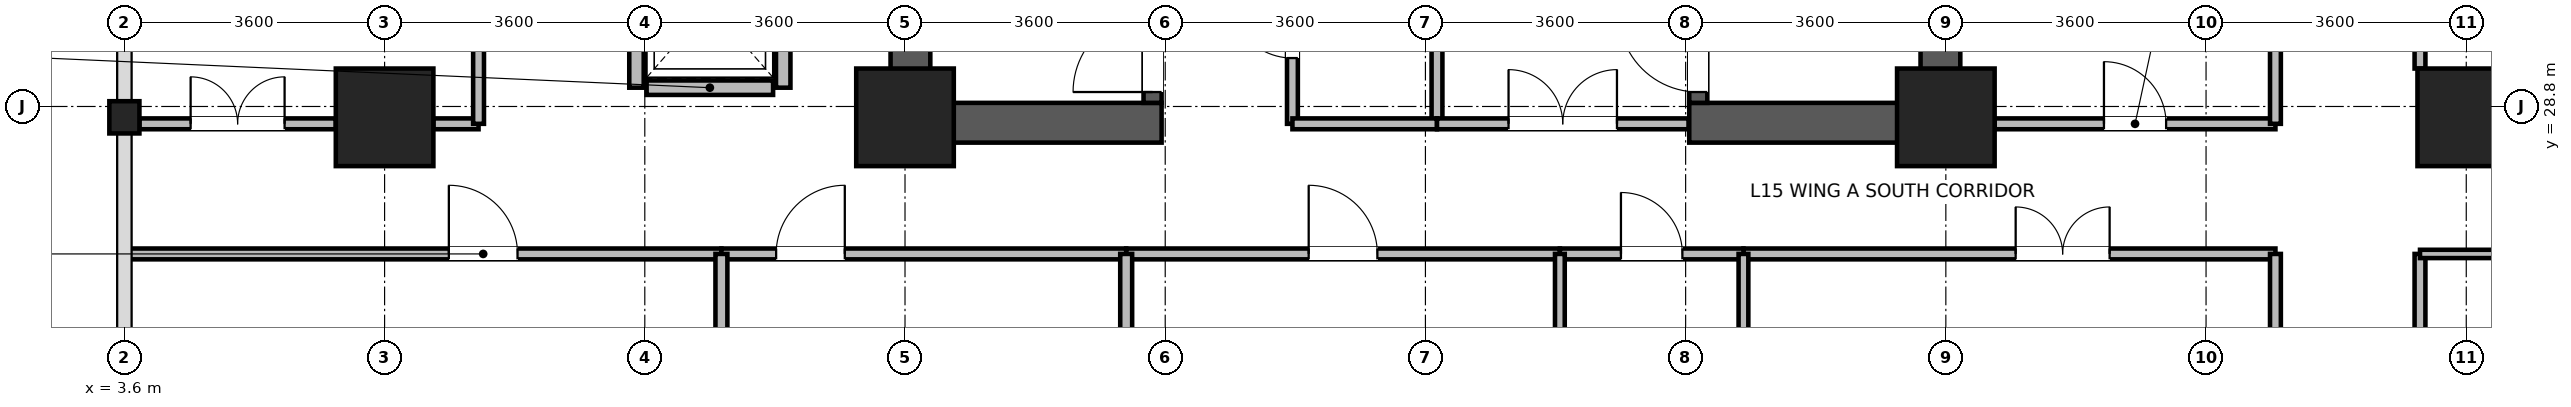
"""IFC4 building model, lengths in metres.
Left out: names, types, materials, properties, quantities, classifications, styles, units other than length and angle.
Written with IfcOpenShell. Run it as: python <this file> out.ifc"""

import sys

from ifc_helpers import new_model, si_unit, direction, frame, frame_2d, origin, origin_2d, place, context, subcontext, project, spatial, rectangle, i_section, extrude, source, transform, mapped, element, fill, save


model = new_model("IFC4")
c1 = context("Model", 3, precision=1e-05, world=origin(), true_north=direction((0.0, 1.0)))
c2 = subcontext(c1, "Body", "Model", "MODEL_VIEW")
j1 = project(units=[si_unit("LENGTHUNIT", "METRE"), si_unit("PLANEANGLEUNIT", "RADIAN")], contexts=[c1])
p1 = place(None, origin())
s1 = spatial("IfcSite", under=j1, at=p1, CompositionType="ELEMENT")
p2 = place(p1, origin())
s2 = spatial("IfcBuilding", under=s1, at=p2, CompositionType="ELEMENT")
p3 = place(p2, frame((0.0, 0.0, 62.3)))
s3 = spatial("IfcBuildingStorey", under=s2, at=p3, CompositionType="ELEMENT", Elevation=62.3)
for number, where, z_axis, x_axis in (
    (1, (14.475, 28.3, 0.0), (0.0, 0.0, 1.0), (0.0, 1.0, 0.0)),
    (2, (28.725, 28.3, 0.0), (0.0, 0.0, 1.0), (0.0, 1.0, 0.0)),
):
    element("IfcWall", number, at=place(p3, frame(where, z_axis=z_axis, x_axis=x_axis)), inside=s3, PredefinedType="SHEAR", context=c2, shape_type="SweptSolid", body=[
        extrude(rectangle(XDim=8.1, YDim=0.55, at=frame_2d((4.05, 0.0))), origin(), (0.0, 0.0, 1.0), 3.45),
    ])
for number, where, z_axis, x_axis in (
    (3, (14.75, 28.575, 0.0), (0.0, 0.0, 1.0), (1.0, 0.0, 0.0)),
    (4, (25.25, 28.575, 0.0), (0.0, 0.0, 1.0), (1.0, 0.0, 0.0)),
):
    element("IfcWall", number, at=place(p3, frame(where, z_axis=z_axis, x_axis=x_axis)), inside=s3, PredefinedType="SHEAR", context=c2, shape_type="SweptSolid", body=[
        extrude(rectangle(XDim=3.2, YDim=0.55, at=frame_2d((1.6, 0.0))), origin(), (0.0, 0.0, 1.0), 3.45),
    ])
p4 = place(p3, frame((17.825, 28.85, 0.0), z_axis=(0.0, 0.0, 1.0), x_axis=(0.0, 1.0, 0.0)))
e5 = element("IfcWall", 5, at=p4, inside=s3, PredefinedType="SHEAR", context=c2, shape_type="SweptSolid", body=[
    extrude(rectangle(XDim=7.0, YDim=0.25, at=frame_2d((3.5, 0.0))), origin(), (0.0, 0.0, 1.0), 3.45),
])
p5 = place(p4, frame((0.15, 0.0, 0.0)))
e6 = element("IfcOpeningElement", 6, at=p5, cuts=e5, PredefinedType="OPENING", context=c2, shape_type="SweptSolid", body=[
    extrude(rectangle(XDim=1.1, YDim=2.08, at=frame_2d((0.55, 1.04))), frame((0.0, 0.135, 0.0), z_axis=(0.0, -1.0, 0.0), x_axis=(1.0, 0.0, 0.0)), (0.0, 0.0, 1.0), 0.27),
])
p6 = place(p3, frame((25.375, 28.85, 0.0), z_axis=(0.0, 0.0, 1.0), x_axis=(0.0, 1.0, 0.0)))
e7 = element("IfcWall", 7, at=p6, inside=s3, PredefinedType="SHEAR", context=c2, shape_type="SweptSolid", body=[
    extrude(rectangle(XDim=7.0, YDim=0.25, at=frame_2d((3.5, 0.0))), origin(), (0.0, 0.0, 1.0), 3.45),
])
p7 = place(p6, frame((0.15, 0.0, 0.0)))
e8 = element("IfcOpeningElement", 8, at=p7, cuts=e7, PredefinedType="OPENING", context=c2, shape_type="SweptSolid", body=[
    extrude(rectangle(XDim=1.1, YDim=2.08, at=frame_2d((0.55, 1.04))), frame((0.0, 0.135, 0.0), z_axis=(0.0, -1.0, 0.0), x_axis=(1.0, 0.0, 0.0)), (0.0, 0.0, 1.0), 0.27),
])
m1 = source(origin(), c2, "Body", "SweptSolid", [
    extrude(rectangle(XDim=1.35, YDim=1.35, at=origin_2d()), origin(), (0.0, 0.0, 1.0), 3.7),
])
for number, where, z_axis, x_axis in (
    (9, (7.2, 28.65, 0.0), (0.0, 0.0, 1.0), (1.0, 0.0, 0.0)),
    (10, (14.4, 28.65, 0.0), (0.0, 0.0, 1.0), (1.0, 0.0, 0.0)),
    (11, (28.8, 28.65, 0.0), (0.0, 0.0, 1.0), (1.0, 0.0, 0.0)),
    (12, (36.0, 28.65, 0.0), (0.0, 0.0, 1.0), (1.0, 0.0, 0.0)),
):
    element("IfcColumn", number, at=place(p3, frame(where, z_axis=z_axis, x_axis=x_axis)), inside=s3, PredefinedType="COLUMN", context=c2, shape_type="MappedRepresentation", body=[
        mapped(m1, transform((0.0, 0.0, 0.0), x_axis=(1.0, 0.0, 0.0), y_axis=(0.0, 1.0, 0.0), z_axis=(0.0, 0.0, 1.0), scale=1.0)),
    ])
m2 = source(origin(), c2, "Body", "SweptSolid", [
    extrude(i_section(OverallWidth=0.416, OverallDepth=0.446, WebThickness=0.029, FlangeThickness=0.04, FilletRadius=0.015, at=origin_2d()), origin(), (0.0, 0.0, 1.0), 3.7),
])
p8 = place(p3, frame((3.6, 28.65, 0.0), z_axis=(0.0, 0.0, 1.0), x_axis=(1.0, 0.0, 0.0)))
e13 = element("IfcColumn", 13, at=p8, inside=s3, PredefinedType="COLUMN", context=c2, shape_type="MappedRepresentation", body=[
    mapped(m2, transform((0.0, 0.0, 0.0), x_axis=(1.0, 0.0, 0.0), y_axis=(0.0, 1.0, 0.0), z_axis=(0.0, 0.0, 1.0), scale=1.0)),
])
p9 = place(p3, frame((10.825, 29.06, 0.0), z_axis=(0.0, 0.0, 1.0), x_axis=(1.0, 0.0, 0.0)))
e14 = element("IfcWall", 14, at=p9, inside=s3, PredefinedType="PARTITIONING", context=c2, shape_type="SweptSolid", body=[
    extrude(rectangle(XDim=1.75, YDim=0.2, at=frame_2d((0.875, 0.0))), origin(), (0.0, 0.0, 1.0), 3.43),
])
for number, where, z_axis, x_axis in (
    (15, (10.685, 29.06, 0.0), (0.0, 0.0, 1.0), (0.0, 1.0, 0.0)),
    (16, (12.715, 29.06, 0.0), (0.0, 0.0, 1.0), (0.0, 1.0, 0.0)),
):
    element("IfcWall", number, at=place(p3, frame(where, z_axis=z_axis, x_axis=x_axis)), inside=s3, PredefinedType="PARTITIONING", context=c2, shape_type="SweptSolid", body=[
        extrude(rectangle(XDim=2.28, YDim=0.2, at=frame_2d((1.14, 0.0))), origin(), (0.0, 0.0, 1.0), 3.43),
    ])
p10 = place(p3, frame((35.36, 22.275, 0.0), z_axis=(0.0, 0.0, 1.0), x_axis=(0.0, 1.0, 0.0)))
e17 = element("IfcWall", 17, at=p10, inside=s3, PredefinedType="PARTITIONING", context=c2, shape_type="SweptSolid", body=[
    extrude(rectangle(XDim=4.485, YDim=0.15, at=frame_2d((2.243, 0.0))), origin(), (0.0, 0.0, 1.0), 3.43),
])
p11 = place(p3, frame((3.62, 26.76, 0.0), z_axis=(0.0, 0.0, 1.0), x_axis=(1.0, 0.0, 0.0)))
e18 = element("IfcWall", 18, at=p11, inside=s3, PredefinedType="PARTITIONING", context=c2, shape_type="SweptSolid", body=[
    extrude(rectangle(XDim=8.24, YDim=0.15, at=frame_2d((4.12, 0.0))), origin(), (0.0, 0.0, 1.0), 3.43),
])
p12 = place(p11, frame((4.469, 0.0, 0.0)))
e19 = element("IfcOpeningElement", 19, at=p12, cuts=e18, PredefinedType="OPENING", context=c2, shape_type="SweptSolid", body=[
    extrude(rectangle(XDim=0.95, YDim=2.1, at=frame_2d((0.475, 1.05))), frame((0.0, 0.085, 0.0), z_axis=(0.0, -1.0, 0.0), x_axis=(1.0, 0.0, 0.0)), (0.0, 0.0, 1.0), 0.17),
])
p13 = place(p3, frame((35.36, 29.325, 0.0), z_axis=(0.0, 0.0, 1.0), x_axis=(0.0, 1.0, 0.0)))
e20 = element("IfcWall", 20, at=p13, inside=s3, PredefinedType="PARTITIONING", context=c2, shape_type="SweptSolid", body=[
    extrude(rectangle(XDim=6.15, YDim=0.15, at=frame_2d((3.075, 0.0))), origin(), (0.0, 0.0, 1.0), 3.43),
])
p14 = place(p13, frame((2.425, 0.0, 0.0)))
e21 = element("IfcOpeningElement", 21, at=p14, cuts=e20, PredefinedType="OPENING", context=c2, shape_type="SweptSolid", body=[
    extrude(rectangle(XDim=1.3, YDim=2.12, at=frame_2d((0.65, 1.06))), frame((0.0, 0.085, 0.0), z_axis=(0.0, -1.0, 0.0), x_axis=(1.0, 0.0, 0.0)), (0.0, 0.0, 1.0), 0.17),
])
p15 = place(p3, frame((26.0, 26.76, 0.0), z_axis=(0.0, 0.0, 1.0), x_axis=(1.0, 0.0, 0.0)))
e22 = element("IfcWall", 22, at=p15, inside=s3, PredefinedType="PARTITIONING", context=c2, shape_type="SweptSolid", body=[
    extrude(rectangle(XDim=7.36, YDim=0.15, at=frame_2d((3.68, 0.0))), origin(), (0.0, 0.0, 1.0), 3.43),
])
p16 = place(p15, frame((3.766, 0.0, 0.0)))
e23 = element("IfcOpeningElement", 23, at=p16, cuts=e22, PredefinedType="OPENING", context=c2, shape_type="SweptSolid", body=[
    extrude(rectangle(XDim=1.3, YDim=2.12, at=frame_2d((0.65, 1.06))), frame((0.0, 0.085, 0.0), z_axis=(0.0, -1.0, 0.0), x_axis=(1.0, 0.0, 0.0)), (0.0, 0.0, 1.0), 0.17),
])
p17 = place(p3, frame((17.46, 26.76, 0.0), z_axis=(0.0, 0.0, 1.0), x_axis=(1.0, 0.0, 0.0)))
e24 = element("IfcWall", 24, at=p17, inside=s3, PredefinedType="PARTITIONING", context=c2, shape_type="SweptSolid", body=[
    extrude(rectangle(XDim=6.0, YDim=0.15, at=frame_2d((3.0, 0.0))), origin(), (0.0, 0.0, 1.0), 3.43),
])
p18 = place(p17, frame((2.525, 0.0, 0.0)))
e25 = element("IfcOpeningElement", 25, at=p18, cuts=e24, PredefinedType="OPENING", context=c2, shape_type="SweptSolid", body=[
    extrude(rectangle(XDim=0.95, YDim=2.1, at=frame_2d((0.475, 1.05))), frame((0.0, 0.085, 0.0), z_axis=(0.0, -1.0, 0.0), x_axis=(1.0, 0.0, 0.0)), (0.0, 0.0, 1.0), 0.17),
])
p19 = place(p3, frame((11.86, 26.76, 0.0), z_axis=(0.0, 0.0, 1.0), x_axis=(1.0, 0.0, 0.0)))
e26 = element("IfcWall", 26, at=p19, inside=s3, PredefinedType="PARTITIONING", context=c2, shape_type="SweptSolid", body=[
    extrude(rectangle(XDim=5.6, YDim=0.15, at=frame_2d((2.8, 0.0))), origin(), (0.0, 0.0, 1.0), 3.43),
])
p20 = place(p19, frame((0.757, 0.0, 0.0)))
e27 = element("IfcOpeningElement", 27, at=p20, cuts=e26, PredefinedType="OPENING", context=c2, shape_type="SweptSolid", body=[
    extrude(rectangle(XDim=0.95, YDim=2.1, at=frame_2d((0.475, 1.05))), frame((0.0, 0.085, 0.0), z_axis=(0.0, -1.0, 0.0), x_axis=(1.0, 0.0, 0.0)), (0.0, 0.0, 1.0), 0.17),
])
p21 = place(p3, frame((33.36, 21.6, 0.0), z_axis=(0.0, 0.0, 1.0), x_axis=(0.0, 1.0, 0.0)))
e28 = element("IfcWall", 28, at=p21, inside=s3, PredefinedType="PARTITIONING", context=c2, shape_type="SweptSolid", body=[
    extrude(rectangle(XDim=5.16, YDim=0.15, at=frame_2d((2.58, 0.0))), origin(), (0.0, 0.0, 1.0), 3.43),
])
p22 = place(p3, frame((3.808, 28.56, 0.0), z_axis=(0.0, 0.0, 1.0), x_axis=(1.0, 0.0, 0.0)))
e29 = element("IfcWall", 29, at=p22, inside=s3, PredefinedType="PARTITIONING", context=c2, shape_type="SweptSolid", body=[
    extrude(rectangle(XDim=2.717, YDim=0.15, at=frame_2d((1.358, 0.0))), origin(), (0.0, 0.0, 1.0), 2.78),
])
p23 = place(p22, frame((0.708, 0.0, 0.0)))
e30 = element("IfcOpeningElement", 30, at=p23, cuts=e29, PredefinedType="OPENING", context=c2, shape_type="SweptSolid", body=[
    extrude(rectangle(XDim=1.3, YDim=2.12, at=frame_2d((0.65, 1.06))), frame((0.0, 0.085, 0.0), z_axis=(0.0, -1.0, 0.0), x_axis=(1.0, 0.0, 0.0)), (0.0, 0.0, 1.0), 0.17),
])
p24 = place(p3, frame((7.875, 28.56, 0.0), z_axis=(0.0, 0.0, 1.0), x_axis=(1.0, 0.0, 0.0)))
e31 = element("IfcWall", 31, at=p24, inside=s3, PredefinedType="PARTITIONING", context=c2, shape_type="SweptSolid", body=[
    extrude(rectangle(XDim=0.625, YDim=0.15, at=frame_2d((0.312, 0.0))), origin(), (0.0, 0.0, 1.0), 2.78),
])
p25 = place(p3, frame((29.475, 28.56, 0.0), z_axis=(0.0, 0.0, 1.0), x_axis=(1.0, 0.0, 0.0)))
e32 = element("IfcWall", 32, at=p25, inside=s3, PredefinedType="PARTITIONING", context=c2, shape_type="SweptSolid", body=[
    extrude(rectangle(XDim=3.885, YDim=0.15, at=frame_2d((1.942, 0.0))), origin(), (0.0, 0.0, 1.0), 2.78),
])
p26 = place(p25, frame((1.512, 0.0, 0.0)))
e33 = element("IfcOpeningElement", 33, at=p26, cuts=e32, PredefinedType="OPENING", context=c2, shape_type="SweptSolid", body=[
    extrude(rectangle(XDim=0.86, YDim=2.02, at=frame_2d((0.43, 1.01))), frame((0.0, 0.085, 0.0), z_axis=(0.0, -1.0, 0.0), x_axis=(1.0, 0.0, 0.0)), (0.0, 0.0, 1.0), 0.17),
])
p27 = place(p3, frame((8.5, 28.56, 0.0), z_axis=(0.0, 0.0, 1.0), x_axis=(0.0, 1.0, 0.0)))
e34 = element("IfcWall", 34, at=p27, inside=s3, PredefinedType="PARTITIONING", context=c2, shape_type="SweptSolid", body=[
    extrude(rectangle(XDim=3.84, YDim=0.15, at=frame_2d((1.92, 0.0))), origin(), (0.0, 0.0, 1.0), 3.43),
])
p28 = place(p3, frame((33.36, 28.56, 0.0), z_axis=(0.0, 0.0, 1.0), x_axis=(0.0, 1.0, 0.0)))
e35 = element("IfcWall", 35, at=p28, inside=s3, PredefinedType="PARTITIONING", context=c2, shape_type="SweptSolid", body=[
    extrude(rectangle(XDim=3.08, YDim=0.15, at=frame_2d((1.54, 0.0))), origin(), (0.0, 0.0, 1.0), 3.43),
])
p29 = place(p3, frame((19.76, 28.56, 0.0), z_axis=(0.0, 0.0, 1.0), x_axis=(0.0, 1.0, 0.0)))
e36 = element("IfcWall", 36, at=p29, inside=s3, PredefinedType="PARTITIONING", context=c2, shape_type="SweptSolid", body=[
    extrude(rectangle(XDim=2.68, YDim=0.15, at=frame_2d((1.34, 0.0))), origin(), (0.0, 0.0, 1.0), 3.43),
])
p30 = place(p29, frame((0.91, 0.0, 0.0)))
e37 = element("IfcOpeningElement", 37, at=p30, cuts=e36, PredefinedType="OPENING", context=c2, shape_type="SweptSolid", body=[
    extrude(rectangle(XDim=0.86, YDim=2.02, at=frame_2d((0.43, 1.01))), frame((0.0, 0.085, 0.0), z_axis=(0.0, -1.0, 0.0), x_axis=(1.0, 0.0, 0.0)), (0.0, 0.0, 1.0), 0.17),
])
p31 = place(p3, frame((21.76, 28.56, 0.0), z_axis=(0.0, 0.0, 1.0), x_axis=(0.0, 1.0, 0.0)))
e38 = element("IfcWall", 38, at=p31, inside=s3, PredefinedType="PARTITIONING", context=c2, shape_type="SweptSolid", body=[
    extrude(rectangle(XDim=2.68, YDim=0.15, at=frame_2d((1.34, 0.0))), origin(), (0.0, 0.0, 1.0), 3.43),
])
p32 = place(p3, frame((23.46, 26.76, 0.0), z_axis=(0.0, 0.0, 1.0), x_axis=(1.0, 0.0, 0.0)))
e39 = element("IfcWall", 39, at=p32, inside=s3, PredefinedType="PARTITIONING", context=c2, shape_type="SweptSolid", body=[
    extrude(rectangle(XDim=2.54, YDim=0.15, at=frame_2d((1.27, 0.0))), origin(), (0.0, 0.0, 1.0), 3.43),
])
p33 = place(p32, frame((0.845, 0.0, 0.0)))
e40 = element("IfcOpeningElement", 40, at=p33, cuts=e39, PredefinedType="OPENING", context=c2, shape_type="SweptSolid", body=[
    extrude(rectangle(XDim=0.85, YDim=2.04, at=frame_2d((0.425, 1.02))), frame((0.0, 0.085, 0.0), z_axis=(0.0, -1.0, 0.0), x_axis=(1.0, 0.0, 0.0)), (0.0, 0.0, 1.0), 0.17),
])
p34 = place(p3, frame((19.76, 28.56, 0.0), z_axis=(0.0, 0.0, 1.0), x_axis=(1.0, 0.0, 0.0)))
e41 = element("IfcWall", 41, at=p34, inside=s3, PredefinedType="PARTITIONING", context=c2, shape_type="SweptSolid", body=[
    extrude(rectangle(XDim=2.0, YDim=0.15, at=frame_2d((1.0, 0.0))), origin(), (0.0, 0.0, 1.0), 2.23),
])
p35 = place(p3, frame((35.36, 26.76, 0.0), z_axis=(0.0, 0.0, 1.0), x_axis=(1.0, 0.0, 0.0)))
e42 = element("IfcWall", 42, at=p35, inside=s3, PredefinedType="PARTITIONING", context=c2, shape_type="SweptSolid", body=[
    extrude(rectangle(XDim=6.04, YDim=0.115, at=frame_2d((3.02, 0.0))), origin(), (0.0, 0.0, 1.0), 3.43),
])
p36 = place(p3, frame((17.46, 21.732, 0.0), z_axis=(0.0, 0.0, 1.0), x_axis=(0.0, 1.0, 0.0)))
e43 = element("IfcWall", 43, at=p36, inside=s3, PredefinedType="PARTITIONING", context=c2, shape_type="SweptSolid", body=[
    extrude(rectangle(XDim=5.028, YDim=0.165, at=frame_2d((2.514, 0.0))), origin(), (0.0, 0.0, 1.0), 3.43),
])
for number, where, z_axis, x_axis in (
    (44, (23.46, 21.732, 0.0), (0.0, 0.0, 1.0), (0.0, 1.0, 0.0)),
    (45, (26.0, 21.732, 0.0), (0.0, 0.0, 1.0), (0.0, 1.0, 0.0)),
):
    element("IfcWall", number, at=place(p3, frame(where, z_axis=z_axis, x_axis=x_axis)), inside=s3, PredefinedType="PARTITIONING", context=c2, shape_type="SweptSolid", body=[
        extrude(rectangle(XDim=5.028, YDim=0.135, at=frame_2d((2.514, 0.0))), origin(), (0.0, 0.0, 1.0), 3.43),
    ])
p37 = place(p3, frame((21.76, 28.56, 0.0), z_axis=(0.0, 0.0, 1.0), x_axis=(1.0, 0.0, 0.0)))
e46 = element("IfcWall", 46, at=p37, inside=s3, PredefinedType="PARTITIONING", context=c2, shape_type="SweptSolid", body=[
    extrude(rectangle(XDim=3.48, YDim=0.15, at=frame_2d((1.74, 0.0))), origin(), (0.0, 0.0, 1.0), 2.23),
])
p38 = place(p37, frame((0.99, 0.0, 0.0)))
e47 = element("IfcOpeningElement", 47, at=p38, cuts=e46, PredefinedType="OPENING", context=c2, shape_type="SweptSolid", body=[
    extrude(rectangle(XDim=1.5, YDim=2.1, at=frame_2d((0.75, 1.05))), frame((0.0, 0.085, 0.0), z_axis=(0.0, -1.0, 0.0), x_axis=(1.0, 0.0, 0.0)), (0.0, 0.0, 1.0), 0.17),
])
p39 = place(p3, frame((11.86, 23.5, 0.0), z_axis=(0.0, 0.0, 1.0), x_axis=(0.0, 1.0, 0.0)))
e48 = element("IfcWall", 48, at=p39, inside=s3, PredefinedType="PARTITIONING", context=c2, shape_type="SweptSolid", body=[
    extrude(rectangle(XDim=3.26, YDim=0.165, at=frame_2d((1.63, 0.0))), origin(), (0.0, 0.0, 1.0), 3.43),
])
p40 = place(p5, origin())
e49 = element("IfcDoor", 49, at=p40, inside=s3, OperationType="SINGLE_SWING_LEFT", PredefinedType="DOOR", context=c2, shape_type="SweptSolid", body=[
    extrude(rectangle(XDim=1.1, YDim=2.08, at=frame_2d((0.55, 1.04))), frame((0.0, 0.025, 0.0), z_axis=(0.0, -1.0, 0.0), x_axis=(1.0, 0.0, 0.0)), (0.0, 0.0, 1.0), 0.05),
])
fill(e6, e49)
p41 = place(p7, origin())
e50 = element("IfcDoor", 50, at=p41, inside=s3, OperationType="SINGLE_SWING_RIGHT", PredefinedType="DOOR", context=c2, shape_type="SweptSolid", body=[
    extrude(rectangle(XDim=1.1, YDim=2.08, at=frame_2d((0.55, 1.04))), frame((0.0, 0.025, 0.0), z_axis=(0.0, -1.0, 0.0), x_axis=(1.0, 0.0, 0.0)), (0.0, 0.0, 1.0), 0.05),
])
fill(e8, e50)
p42 = place(p12, origin())
e51 = element("IfcDoor", 51, at=p42, inside=s3, OperationType="SINGLE_SWING_LEFT", PredefinedType="DOOR", context=c2, shape_type="SweptSolid", body=[
    extrude(rectangle(XDim=0.95, YDim=2.1, at=frame_2d((0.475, 1.05))), frame((0.0, 0.025, 0.0), z_axis=(0.0, -1.0, 0.0), x_axis=(1.0, 0.0, 0.0)), (0.0, 0.0, 1.0), 0.05),
])
fill(e19, e51)
p43 = place(p16, origin())
e52 = element("IfcDoor", 52, at=p43, inside=s3, OperationType="DOUBLE_DOOR_SINGLE_SWING", PredefinedType="DOOR", context=c2, shape_type="SweptSolid", body=[
    extrude(rectangle(XDim=1.3, YDim=2.12, at=frame_2d((0.65, 1.06))), frame((0.0, 0.025, 0.0), z_axis=(0.0, -1.0, 0.0), x_axis=(1.0, 0.0, 0.0)), (0.0, 0.0, 1.0), 0.05),
])
fill(e23, e52)
p44 = place(p18, origin())
e53 = element("IfcDoor", 53, at=p44, inside=s3, OperationType="SINGLE_SWING_LEFT", PredefinedType="DOOR", context=c2, shape_type="SweptSolid", body=[
    extrude(rectangle(XDim=0.95, YDim=2.1, at=frame_2d((0.475, 1.05))), frame((0.0, 0.025, 0.0), z_axis=(0.0, -1.0, 0.0), x_axis=(1.0, 0.0, 0.0)), (0.0, 0.0, 1.0), 0.05),
])
fill(e25, e53)
p45 = place(p20, origin())
e54 = element("IfcDoor", 54, at=p45, inside=s3, OperationType="SINGLE_SWING_RIGHT", PredefinedType="DOOR", context=c2, shape_type="SweptSolid", body=[
    extrude(rectangle(XDim=0.95, YDim=2.1, at=frame_2d((0.475, 1.05))), frame((0.0, 0.025, 0.0), z_axis=(0.0, -1.0, 0.0), x_axis=(1.0, 0.0, 0.0)), (0.0, 0.0, 1.0), 0.05),
])
fill(e27, e54)
p46 = place(p23, origin())
e55 = element("IfcDoor", 55, at=p46, inside=s3, OperationType="DOUBLE_DOOR_SINGLE_SWING", PredefinedType="DOOR", context=c2, shape_type="SweptSolid", body=[
    extrude(rectangle(XDim=1.3, YDim=2.12, at=frame_2d((0.65, 1.06))), frame((0.0, 0.025, 0.0), z_axis=(0.0, -1.0, 0.0), x_axis=(1.0, 0.0, 0.0)), (0.0, 0.0, 1.0), 0.05),
])
fill(e30, e55)
p47 = place(p26, origin())
e56 = element("IfcDoor", 56, at=p47, inside=s3, OperationType="SINGLE_SWING_LEFT", PredefinedType="DOOR", context=c2, shape_type="SweptSolid", body=[
    extrude(rectangle(XDim=0.86, YDim=2.02, at=frame_2d((0.43, 1.01))), frame((0.0, 0.025, 0.0), z_axis=(0.0, -1.0, 0.0), x_axis=(1.0, 0.0, 0.0)), (0.0, 0.0, 1.0), 0.05),
])
fill(e33, e56)
p48 = place(p30, origin())
e57 = element("IfcDoor", 57, at=p48, inside=s3, OperationType="SINGLE_SWING_RIGHT", PredefinedType="DOOR", context=c2, shape_type="SweptSolid", body=[
    extrude(rectangle(XDim=0.86, YDim=2.02, at=frame_2d((0.43, 1.01))), frame((0.0, 0.025, 0.0), z_axis=(0.0, -1.0, 0.0), x_axis=(1.0, 0.0, 0.0)), (0.0, 0.0, 1.0), 0.05),
])
fill(e37, e57)
p49 = place(p33, origin())
e58 = element("IfcDoor", 58, at=p49, inside=s3, OperationType="SINGLE_SWING_LEFT", PredefinedType="DOOR", context=c2, shape_type="SweptSolid", body=[
    extrude(rectangle(XDim=0.85, YDim=2.04, at=frame_2d((0.425, 1.02))), frame((0.0, 0.025, 0.0), z_axis=(0.0, -1.0, 0.0), x_axis=(1.0, 0.0, 0.0)), (0.0, 0.0, 1.0), 0.05),
])
fill(e40, e58)
p50 = place(p38, origin())
e59 = element("IfcDoor", 59, at=p50, inside=s3, OperationType="DOUBLE_DOOR_SINGLE_SWING", PredefinedType="DOOR", context=c2, shape_type="SweptSolid", body=[
    extrude(rectangle(XDim=1.5, YDim=2.1, at=frame_2d((0.75, 1.05))), frame((0.0, 0.025, 0.0), z_axis=(0.0, -1.0, 0.0), x_axis=(1.0, 0.0, 0.0)), (0.0, 0.0, 1.0), 0.05),
])
fill(e47, e59)
save(model, sys.argv[1])
